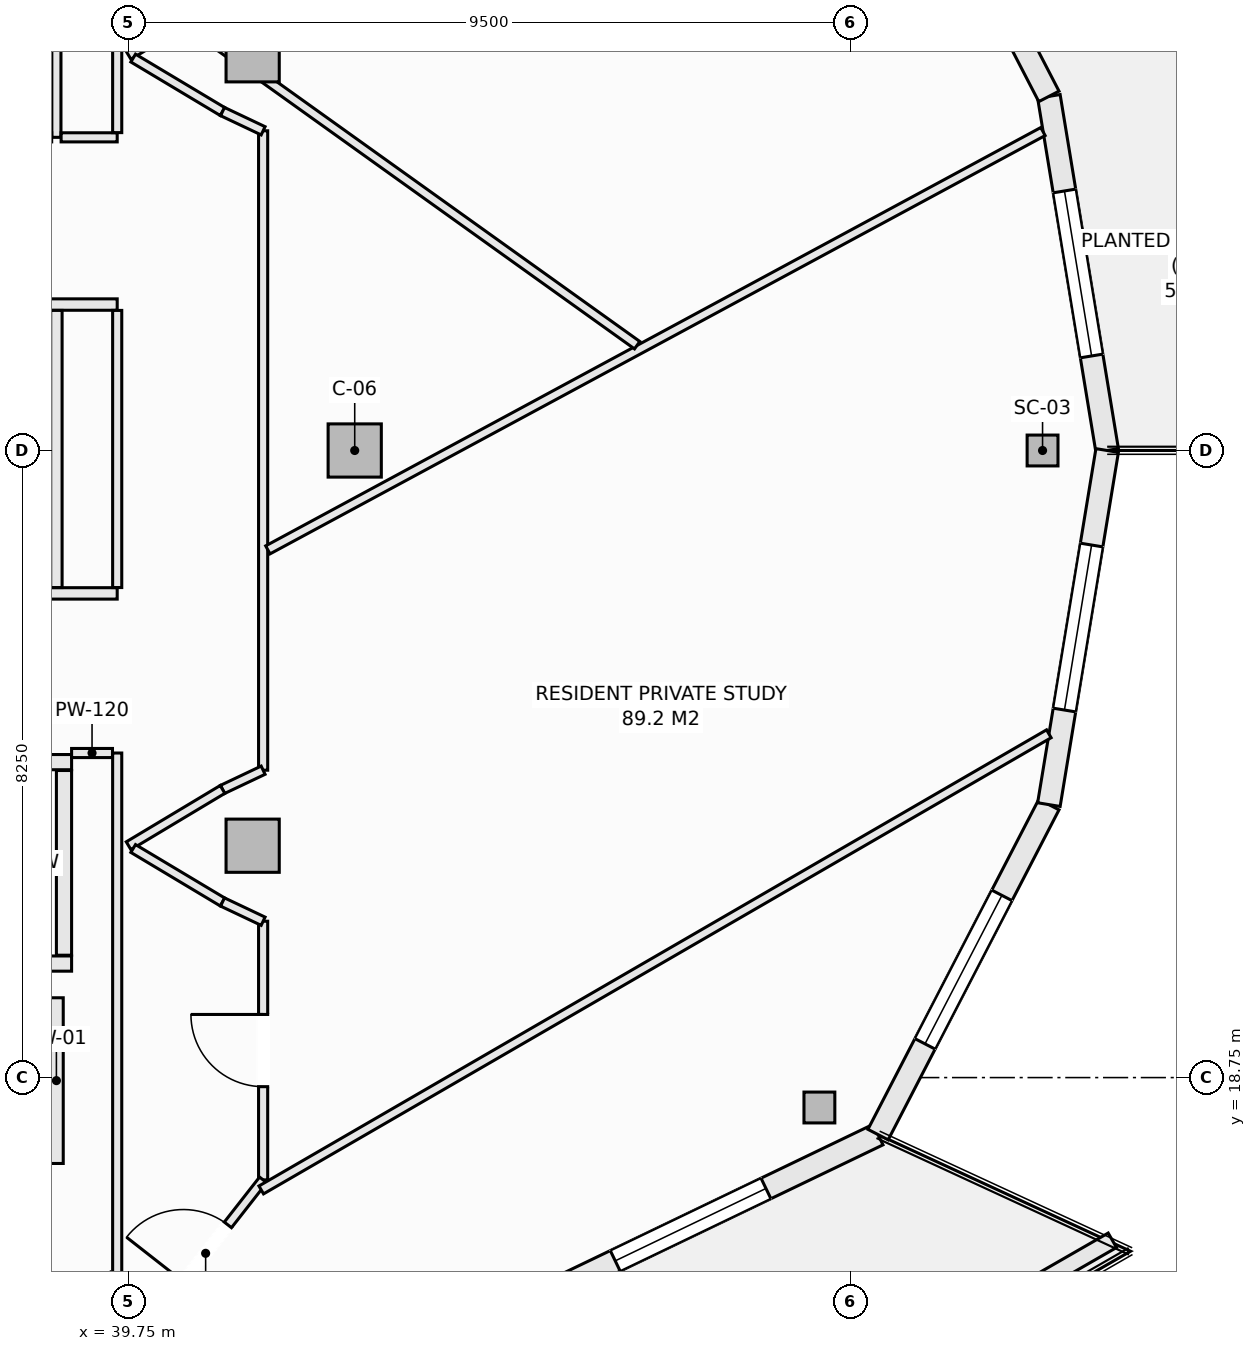
"""IFC4 building model, lengths in metres.
Left out: names, types, materials, properties, quantities, classifications, styles, units other than length and angle.
Written with IfcOpenShell. Run it as: python <this file> out.ifc"""

import sys

from ifc_helpers import new_model, si_unit, direction, frame, frame_2d, origin, origin_2d, place, context, subcontext, project, spatial, rectangle, hollow_rectangle, extrude, element, fill, save


model = new_model("IFC4")
c1 = context("Model", 3, precision=1e-05, world=origin(), true_north=direction((0.0, 1.0)))
c2 = subcontext(c1, "Body", "Model", "MODEL_VIEW")
j1 = project(units=[si_unit("LENGTHUNIT", "METRE"), si_unit("PLANEANGLEUNIT", "RADIAN")], contexts=[c1])
p1 = place(None, origin())
s1 = spatial("IfcSite", under=j1, at=p1, CompositionType="ELEMENT")
p2 = place(p1, origin())
s2 = spatial("IfcBuilding", under=s1, at=p2, CompositionType="ELEMENT")
p3 = place(p2, frame((0.0, 0.0, 249.2)))
s3 = spatial("IfcBuildingStorey", under=s2, at=p3, CompositionType="ELEMENT", Elevation=249.2)
for number, where, z_axis, x_axis in (
    (1, (51.775, 27.0, -0.27), (0.0, 0.0, 1.0), (1.0, 0.0, 0.0)),
    (2, (48.839, 18.356, -0.27), (0.0, 0.0, 1.0), (1.0, 0.0, 0.0)),
):
    element("IfcColumn", number, at=place(p3, frame(where, z_axis=z_axis, x_axis=x_axis)), inside=s3, PredefinedType="COLUMN", context=c2, shape_type="SweptSolid", body=[
        extrude(hollow_rectangle(XDim=0.406, YDim=0.406, WallThickness=0.016, at=origin_2d()), origin(), (0.0, 0.0, 1.0), 3.3),
    ])
for number, where, z_axis, x_axis in (
    (3, (42.725, 27.0, -0.27), (0.0, 0.0, 1.0), (1.0, 0.0, 0.0)),
    (4, (41.382, 32.199, -0.27), (0.0, 0.0, 1.0), (1.0, 0.0, 0.0)),
    (5, (41.382, 21.801, -0.27), (0.0, 0.0, 1.0), (1.0, 0.0, 0.0)),
):
    element("IfcColumn", number, at=place(p3, frame(where, z_axis=z_axis, x_axis=x_axis)), inside=s3, PredefinedType="COLUMN", context=c2, shape_type="SweptSolid", body=[
        extrude(rectangle(XDim=0.7, YDim=0.7, at=origin_2d()), origin(), (0.0, 0.0, 1.0), 3.3),
    ])
p4 = place(p3, frame((51.858, 31.659, 0.0), z_axis=(0.0, 0.0, 1.0), x_axis=(0.162369371657, -0.986730047758, 0.0)))
e6 = element("IfcWall", 6, at=p4, inside=s3, PredefinedType="SOLIDWALL", context=c2, shape_type="SweptSolid", body=[
    extrude(rectangle(XDim=4.721, YDim=0.3, at=frame_2d((2.361, 0.0))), origin(), (0.0, 0.0, 1.0), 2.605),
])
p5 = place(p4, frame((1.261, 0.0, 0.72)))
e7 = element("IfcOpeningElement", 7, at=p5, cuts=e6, PredefinedType="OPENING", context=c2, shape_type="SweptSolid", body=[
    extrude(rectangle(XDim=2.2, YDim=1.65, at=frame_2d((1.1, 0.825))), frame((0.0, 0.16, 0.0), z_axis=(0.0, -1.0, 0.0), x_axis=(1.0, 0.0, 0.0)), (0.0, 0.0, 1.0), 0.32),
])
p6 = place(p3, frame((49.611, 36.0, 0.0), z_axis=(0.0, 0.0, 1.0), x_axis=(0.459793771602, -0.888025724625, 0.0)))
e8 = element("IfcWall", 8, at=p6, inside=s3, PredefinedType="SOLIDWALL", context=c2, shape_type="SweptSolid", body=[
    extrude(rectangle(XDim=4.889, YDim=0.3, at=frame_2d((2.444, 0.0))), origin(), (0.0, 0.0, 1.0), 2.605),
])
p7 = place(p6, frame((1.544, 0.0, 0.0)))
e9 = element("IfcOpeningElement", 9, at=p7, cuts=e8, PredefinedType="OPENING", context=c2, shape_type="SweptSolid", body=[
    extrude(rectangle(XDim=1.8, YDim=2.25, at=frame_2d((0.9, 1.125))), frame((0.0, 0.16, 0.0), z_axis=(0.0, -1.0, 0.0), x_axis=(1.0, 0.0, 0.0)), (0.0, 0.0, 1.0), 0.32),
])
p8 = place(p3, frame((44.677, 15.63, 0.0), z_axis=(0.0, 0.0, 1.0), x_axis=(0.901355238351, 0.433080517106, 0.0)))
e10 = element("IfcWall", 10, at=p8, inside=s3, PredefinedType="SOLIDWALL", context=c2, shape_type="SweptSolid", body=[
    extrude(rectangle(XDim=5.473, YDim=0.3, at=frame_2d((2.737, 0.0))), origin(), (0.0, 0.0, 1.0), 2.605),
])
p9 = place(p8, frame((1.637, 0.0, 0.72)))
e11 = element("IfcOpeningElement", 11, at=p9, cuts=e10, PredefinedType="OPENING", context=c2, shape_type="SweptSolid", body=[
    extrude(rectangle(XDim=2.2, YDim=1.65, at=frame_2d((1.1, 0.825))), frame((0.0, 0.16, 0.0), z_axis=(0.0, -1.0, 0.0), x_axis=(1.0, 0.0, 0.0)), (0.0, 0.0, 1.0), 0.32),
])
p10 = place(p3, frame((49.611, 18.0, 0.0), z_axis=(0.0, 0.0, 1.0), x_axis=(0.459793771602, 0.888025724625, 0.0)))
e12 = element("IfcWall", 12, at=p10, inside=s3, PredefinedType="SOLIDWALL", context=c2, shape_type="SweptSolid", body=[
    extrude(rectangle(XDim=4.889, YDim=0.3, at=frame_2d((2.444, 0.0))), origin(), (0.0, 0.0, 1.0), 2.605),
])
p11 = place(p10, frame((1.344, 0.0, 0.72)))
e13 = element("IfcOpeningElement", 13, at=p11, cuts=e12, PredefinedType="OPENING", context=c2, shape_type="SweptSolid", body=[
    extrude(rectangle(XDim=2.2, YDim=1.65, at=frame_2d((1.1, 0.825))), frame((0.0, 0.16, 0.0), z_axis=(0.0, -1.0, 0.0), x_axis=(1.0, 0.0, 0.0)), (0.0, 0.0, 1.0), 0.32),
])
p12 = place(p3, frame((51.858, 22.341, 0.0), z_axis=(0.0, 0.0, 1.0), x_axis=(0.162369371657, 0.986730047758, 0.0)))
e14 = element("IfcWall", 14, at=p12, inside=s3, PredefinedType="SOLIDWALL", context=c2, shape_type="SweptSolid", body=[
    extrude(rectangle(XDim=4.721, YDim=0.3, at=frame_2d((2.361, 0.0))), origin(), (0.0, 0.0, 1.0), 2.605),
])
p13 = place(p12, frame((1.261, 0.0, 0.72)))
e15 = element("IfcOpeningElement", 15, at=p13, cuts=e14, PredefinedType="OPENING", context=c2, shape_type="SweptSolid", body=[
    extrude(rectangle(XDim=2.2, YDim=1.65, at=frame_2d((1.1, 0.825))), frame((0.0, 0.16, 0.0), z_axis=(0.0, -1.0, 0.0), x_axis=(1.0, 0.0, 0.0)), (0.0, 0.0, 1.0), 0.32),
])
p14 = place(p3, frame((47.321, 13.521, 0.0), z_axis=(0.0, 0.0, 1.0), x_axis=(0.866901621005, 0.49847926687, 0.0)))
e16 = element("IfcWall", 16, at=p14, inside=s3, PredefinedType="PARAPET", context=c2, shape_type="SweptSolid", body=[
    extrude(rectangle(XDim=6.197, YDim=0.22, at=frame_2d((3.098, 0.0))), origin(), (0.0, 0.0, 1.0), 0.52),
])
p15 = place(p3, frame((36.75, 22.9, 0.0), z_axis=(0.0, 0.0, 1.0), x_axis=(1.0, 0.0, 0.0)))
e17 = element("IfcWall", 17, at=p15, inside=s3, PredefinedType="SOLIDWALL", context=c2, shape_type="SweptSolid", body=[
    extrude(rectangle(XDim=2.25, YDim=0.2, at=frame_2d((1.125, 0.0))), origin(), (0.0, 0.0, 1.0), 3.03),
])
p16 = place(p15, frame((0.575, 0.0, 0.0)))
e18 = element("IfcOpeningElement", 18, at=p16, cuts=e17, PredefinedType="OPENING", context=c2, shape_type="SweptSolid", body=[
    extrude(rectangle(XDim=1.1, YDim=2.2, at=frame_2d((0.55, 1.1))), frame((0.0, 0.11, 0.0), z_axis=(0.0, -1.0, 0.0), x_axis=(1.0, 0.0, 0.0)), (0.0, 0.0, 1.0), 0.22),
])
p17 = place(p3, frame((36.75, 20.25, 0.0), z_axis=(0.0, 0.0, 1.0), x_axis=(1.0, 0.0, 0.0)))
e19 = element("IfcWall", 19, at=p17, inside=s3, PredefinedType="SOLIDWALL", context=c2, shape_type="SweptSolid", body=[
    extrude(rectangle(XDim=2.25, YDim=0.2, at=frame_2d((1.125, 0.0))), origin(), (0.0, 0.0, 1.0), 3.03),
])
p18 = place(p3, frame((38.9, 20.36, 0.0), z_axis=(0.0, 0.0, 1.0), x_axis=(0.0, 1.0, 0.0)))
e20 = element("IfcWall", 20, at=p18, inside=s3, PredefinedType="SOLIDWALL", context=c2, shape_type="SweptSolid", body=[
    extrude(rectangle(XDim=2.43, YDim=0.2, at=frame_2d((1.215, 0.0))), origin(), (0.0, 0.0, 1.0), 3.03),
])
p19 = place(p3, frame((29.96, 25.12, 0.0), z_axis=(0.0, 0.0, 1.0), x_axis=(1.0, 0.0, 0.0)))
e21 = element("IfcWall", 21, at=p19, inside=s3, PredefinedType="PARTITIONING", context=c2, shape_type="SweptSolid", body=[
    extrude(rectangle(XDim=9.64, YDim=0.15, at=frame_2d((4.82, 0.0))), origin(), (0.0, 0.0, 1.0), 3.03),
])
p20 = place(p19, frame((3.05, 0.0, 0.0)))
e22 = element("IfcOpeningElement", 22, at=p20, cuts=e21, PredefinedType="OPENING", context=c2, shape_type="SweptSolid", body=[
    extrude(rectangle(XDim=0.95, YDim=2.1, at=frame_2d((0.475, 1.05))), frame((0.0, 0.085, 0.0), z_axis=(0.0, -1.0, 0.0), x_axis=(1.0, 0.0, 0.0)), (0.0, 0.0, 1.0), 0.17),
])
p21 = place(p19, frame((7.265, 0.0, 0.0)))
e23 = element("IfcOpeningElement", 23, at=p21, cuts=e21, PredefinedType="OPENING", context=c2, shape_type="SweptSolid", body=[
    extrude(rectangle(XDim=0.95, YDim=2.1, at=frame_2d((0.475, 1.05))), frame((0.0, 0.085, 0.0), z_axis=(0.0, -1.0, 0.0), x_axis=(1.0, 0.0, 0.0)), (0.0, 0.0, 1.0), 0.17),
])
p22 = place(p3, frame((30.077, 28.92, 0.0), z_axis=(0.0, 0.0, 1.0), x_axis=(1.0, 0.0, 0.0)))
e24 = element("IfcWall", 24, at=p22, inside=s3, PredefinedType="PARTITIONING", context=c2, shape_type="SweptSolid", body=[
    extrude(rectangle(XDim=9.523, YDim=0.15, at=frame_2d((4.762, 0.0))), origin(), (0.0, 0.0, 1.0), 3.03),
])
p23 = place(p3, frame((38.8, 17.62, 0.0), z_axis=(0.0, 0.0, 1.0), x_axis=(0.0, 1.0, 0.0)))
e25 = element("IfcWall", 25, at=p23, inside=s3, PredefinedType="SOLIDWALL", context=c2, shape_type="SweptSolid", body=[
    extrude(rectangle(XDim=2.18, YDim=0.18, at=frame_2d((1.09, 0.0))), origin(), (0.0, 0.0, 1.0), 3.03),
])
p24 = place(p3, frame((38.8, 25.197, 0.0), z_axis=(0.0, 0.0, 1.0), x_axis=(0.0, 1.0, 0.0)))
e26 = element("IfcWall", 26, at=p24, inside=s3, PredefinedType="PARTITIONING", context=c2, shape_type="SweptSolid", body=[
    extrude(rectangle(XDim=3.646, YDim=0.15, at=frame_2d((1.823, 0.0))), origin(), (0.0, 0.0, 1.0), 3.03),
])
p25 = place(p3, frame((38.8, 31.12, 0.0), z_axis=(0.0, 0.0, 1.0), x_axis=(0.0, 1.0, 0.0)))
e27 = element("IfcWall", 27, at=p25, inside=s3, PredefinedType="PARTITIONING", context=c2, shape_type="SweptSolid", body=[
    extrude(rectangle(XDim=2.63, YDim=0.12, at=frame_2d((1.315, 0.0))), origin(), (0.0, 0.0, 1.0), 3.03),
])
p26 = place(p3, frame((38.862, 31.12, 0.0), z_axis=(0.0, 0.0, 1.0), x_axis=(1.0, 0.0, 0.0)))
e28 = element("IfcWall", 28, at=p26, inside=s3, PredefinedType="PARTITIONING", context=c2, shape_type="SweptSolid", body=[
    extrude(rectangle(XDim=0.738, YDim=0.12, at=frame_2d((0.369, 0.0))), origin(), (0.0, 0.0, 1.0), 3.03),
])
p27 = place(p3, frame((39.6, 14.952, 0.0), z_axis=(0.0, 0.0, 1.0), x_axis=(0.0, 1.0, 0.0)))
e29 = element("IfcWall", 29, at=p27, inside=s3, PredefinedType="PARTITIONING", context=c2, shape_type="SweptSolid", body=[
    extrude(rectangle(XDim=8.068, YDim=0.12, at=frame_2d((4.034, 0.0))), origin(), (0.0, 0.0, 1.0), 2.478),
])
p28 = place(p3, frame((39.6, 25.197, 0.0), z_axis=(0.0, 0.0, 1.0), x_axis=(0.0, 1.0, 0.0)))
e30 = element("IfcWall", 30, at=p28, inside=s3, PredefinedType="PARTITIONING", context=c2, shape_type="SweptSolid", body=[
    extrude(rectangle(XDim=3.646, YDim=0.12, at=frame_2d((1.823, 0.0))), origin(), (0.0, 0.0, 1.0), 3.03),
])
p29 = place(p3, frame((39.6, 31.182, 0.0), z_axis=(0.0, 0.0, 1.0), x_axis=(0.0, 1.0, 0.0)))
e31 = element("IfcWall", 31, at=p29, inside=s3, PredefinedType="PARTITIONING", context=c2, shape_type="SweptSolid", body=[
    extrude(rectangle(XDim=7.866, YDim=0.12, at=frame_2d((3.933, 0.0))), origin(), (0.0, 0.0, 1.0), 3.03),
])
p30 = place(p3, frame((41.52, 17.404, 0.0), z_axis=(0.0, 0.0, 1.0), x_axis=(0.0, 1.0, 0.0)))
e32 = element("IfcWall", 32, at=p30, inside=s3, PredefinedType="PARTITIONING", context=c2, shape_type="SweptSolid", body=[
    extrude(rectangle(XDim=3.403, YDim=0.12, at=frame_2d((1.701, 0.0))), origin(), (0.0, 0.0, 1.0), 3.03),
])
p31 = place(p30, frame((1.227, 0.0, 0.0)))
e33 = element("IfcOpeningElement", 33, at=p31, cuts=e32, PredefinedType="OPENING", context=c2, shape_type="SweptSolid", body=[
    extrude(rectangle(XDim=0.95, YDim=2.1, at=frame_2d((0.475, 1.05))), frame((0.0, 0.07, 0.0), z_axis=(0.0, -1.0, 0.0), x_axis=(1.0, 0.0, 0.0)), (0.0, 0.0, 1.0), 0.14),
])
p32 = place(p3, frame((41.52, 22.794, 0.0), z_axis=(0.0, 0.0, 1.0), x_axis=(0.0, 1.0, 0.0)))
e34 = element("IfcWall", 34, at=p32, inside=s3, PredefinedType="PARTITIONING", context=c2, shape_type="SweptSolid", body=[
    extrude(rectangle(XDim=8.412, YDim=0.12, at=frame_2d((4.206, 0.0))), origin(), (0.0, 0.0, 1.0), 2.478),
])
p33 = place(p3, frame((39.75, 32.199, 0.0), z_axis=(0.0, 0.0, 1.0), x_axis=(0.857702120906, 0.514146935996, 0.0)))
e35 = element("IfcWall", 35, at=p33, inside=s3, PredefinedType="PARTITIONING", context=c2, shape_type="SweptSolid", body=[
    extrude(rectangle(XDim=1.441, YDim=0.12, at=frame_2d((0.721, 0.0))), origin(), (0.0, 0.0, 1.0), 3.03),
])
p34 = place(p3, frame((39.81, 32.163, 0.0), z_axis=(0.0, 0.0, 1.0), x_axis=(0.858011245414, -0.513630901273, 0.0)))
e36 = element("IfcWall", 36, at=p34, inside=s3, PredefinedType="PARTITIONING", context=c2, shape_type="SweptSolid", body=[
    extrude(rectangle(XDim=1.37, YDim=0.12, at=frame_2d((0.685, 0.0))), origin(), (0.0, 0.0, 1.0), 3.03),
])
for number, where, z_axis, x_axis in (
    (37, (40.986, 31.459, 0.0), (0.0, 0.0, 1.0), (0.904, -0.428, 0.0)),
    (38, (40.986, 22.541, 0.0), (0.0, 0.0, 1.0), (0.904, 0.428, 0.0)),
):
    element("IfcWall", number, at=place(p3, frame(where, z_axis=z_axis, x_axis=x_axis)), inside=s3, PredefinedType="PARTITIONING", context=c2, shape_type="SweptSolid", body=[
        extrude(rectangle(XDim=0.591, YDim=0.12, at=frame_2d((0.295, 0.0))), origin(), (0.0, 0.0, 1.0), 3.03),
    ])
p35 = place(p3, frame((39.75, 21.8, 0.0), z_axis=(0.0, 0.0, 1.0), x_axis=(0.857702120906, 0.514146935996, 0.0)))
e39 = element("IfcWall", 39, at=p35, inside=s3, PredefinedType="PARTITIONING", context=c2, shape_type="SweptSolid", body=[
    extrude(rectangle(XDim=1.441, YDim=0.12, at=frame_2d((0.721, 0.0))), origin(), (0.0, 0.0, 1.0), 3.03),
])
p36 = place(p3, frame((39.81, 21.764, 0.0), z_axis=(0.0, 0.0, 1.0), x_axis=(0.858011245414, -0.513630901273, 0.0)))
e40 = element("IfcWall", 40, at=p36, inside=s3, PredefinedType="PARTITIONING", context=c2, shape_type="SweptSolid", body=[
    extrude(rectangle(XDim=1.37, YDim=0.12, at=frame_2d((0.685, 0.0))), origin(), (0.0, 0.0, 1.0), 3.03),
])
p37 = place(p3, frame((40.986, 21.06, 0.0), z_axis=(0.0, 0.0, 1.0), x_axis=(0.90356951601, -0.428441512621, 0.0)))
e41 = element("IfcWall", 41, at=p37, inside=s3, PredefinedType="PARTITIONING", context=c2, shape_type="SweptSolid", body=[
    extrude(rectangle(XDim=0.591, YDim=0.12, at=frame_2d((0.295, 0.0))), origin(), (0.0, 0.0, 1.0), 3.03),
])
p38 = place(p3, frame((39.662, 15.031, 0.0), z_axis=(0.0, 0.0, 1.0), x_axis=(0.616500468458, 0.787354540465, 0.0)))
e42 = element("IfcWall", 42, at=p38, inside=s3, PredefinedType="PARTITIONING", context=c2, shape_type="SweptSolid", body=[
    extrude(rectangle(XDim=3.014, YDim=0.12, at=frame_2d((1.507, 0.0))), origin(), (0.0, 0.0, 1.0), 3.03),
])
p39 = place(p38, frame((1.312, 0.0, 0.0)))
e43 = element("IfcOpeningElement", 43, at=p39, cuts=e42, PredefinedType="OPENING", context=c2, shape_type="SweptSolid", body=[
    extrude(rectangle(XDim=0.95, YDim=2.1, at=frame_2d((0.475, 1.05))), frame((0.0, 0.07, 0.0), z_axis=(0.0, -1.0, 0.0), x_axis=(1.0, 0.0, 0.0)), (0.0, 0.0, 1.0), 0.14),
])
p40 = place(p3, frame((39.0, 23.02, 0.0), z_axis=(0.0, 0.0, 1.0), x_axis=(1.0, 0.0, 0.0)))
e44 = element("IfcWall", 44, at=p40, inside=s3, PredefinedType="PARTITIONING", context=c2, shape_type="SweptSolid", body=[
    extrude(rectangle(XDim=0.538, YDim=0.12, at=frame_2d((0.269, 0.0))), origin(), (0.0, 0.0, 1.0), 3.03),
])
p41 = place(p3, frame((41.582, 25.693, 0.0), z_axis=(0.0, 0.0, 1.0), x_axis=(0.880032375067, 0.474913696195, 0.0)))
e45 = element("IfcWall", 45, at=p41, inside=s3, PredefinedType="PARTITIONING", context=c2, shape_type="SweptSolid", body=[
    extrude(rectangle(XDim=11.589, YDim=0.12, at=frame_2d((5.794, 0.0))), origin(), (0.0, 0.0, 1.0), 2.478),
])
p42 = place(p3, frame((41.495, 17.272, 0.0), z_axis=(0.0, 0.0, 1.0), x_axis=(0.865359277242, 0.501151994201, 0.0)))
e46 = element("IfcWall", 46, at=p42, inside=s3, PredefinedType="PARTITIONING", context=c2, shape_type="SweptSolid", body=[
    extrude(rectangle(XDim=11.975, YDim=0.12, at=frame_2d((5.987, 0.0))), origin(), (0.0, 0.0, 1.0), 3.03),
])
p43 = place(p3, frame((40.546, 32.604, 0.0), z_axis=(0.0, 0.0, 1.0), x_axis=(0.813264440548, -0.581894277116, 0.0)))
e47 = element("IfcWall", 47, at=p43, inside=s3, PredefinedType="PARTITIONING", context=c2, shape_type="SweptSolid", body=[
    extrude(rectangle(XDim=7.249, YDim=0.12, at=frame_2d((3.625, 0.0))), origin(), (0.0, 0.0, 1.0), 3.03),
])
p44 = place(p5, origin())
e48 = element("IfcWindow", 48, at=p44, inside=s3, PartitioningType="SINGLE_PANEL", PredefinedType="WINDOW", context=c2, shape_type="SweptSolid", body=[
    extrude(rectangle(XDim=2.2, YDim=1.65, at=frame_2d((1.1, 0.825))), frame((0.0, 0.03, 0.0), z_axis=(0.0, -1.0, 0.0), x_axis=(1.0, 0.0, 0.0)), (0.0, 0.0, 1.0), 0.06),
])
fill(e7, e48)
p45 = place(p9, origin())
e49 = element("IfcWindow", 49, at=p45, inside=s3, PartitioningType="SINGLE_PANEL", PredefinedType="WINDOW", context=c2, shape_type="SweptSolid", body=[
    extrude(rectangle(XDim=2.2, YDim=1.65, at=frame_2d((1.1, 0.825))), frame((0.0, 0.03, 0.0), z_axis=(0.0, -1.0, 0.0), x_axis=(1.0, 0.0, 0.0)), (0.0, 0.0, 1.0), 0.06),
])
fill(e11, e49)
p46 = place(p11, origin())
e50 = element("IfcWindow", 50, at=p46, inside=s3, PartitioningType="SINGLE_PANEL", PredefinedType="WINDOW", context=c2, shape_type="SweptSolid", body=[
    extrude(rectangle(XDim=2.2, YDim=1.65, at=frame_2d((1.1, 0.825))), frame((0.0, 0.03, 0.0), z_axis=(0.0, -1.0, 0.0), x_axis=(1.0, 0.0, 0.0)), (0.0, 0.0, 1.0), 0.06),
])
fill(e13, e50)
p47 = place(p13, origin())
e51 = element("IfcWindow", 51, at=p47, inside=s3, PartitioningType="SINGLE_PANEL", PredefinedType="WINDOW", context=c2, shape_type="SweptSolid", body=[
    extrude(rectangle(XDim=2.2, YDim=1.65, at=frame_2d((1.1, 0.825))), frame((0.0, 0.03, 0.0), z_axis=(0.0, -1.0, 0.0), x_axis=(1.0, 0.0, 0.0)), (0.0, 0.0, 1.0), 0.06),
])
fill(e15, e51)
p48 = place(p39, origin())
e52 = element("IfcDoor", 52, at=p48, inside=s3, OperationType="SINGLE_SWING_LEFT", PredefinedType="DOOR", context=c2, shape_type="SweptSolid", body=[
    extrude(rectangle(XDim=0.95, YDim=2.1, at=frame_2d((0.475, 1.05))), frame((0.0, 0.025, 0.0), z_axis=(0.0, -1.0, 0.0), x_axis=(1.0, 0.0, 0.0)), (0.0, 0.0, 1.0), 0.05),
])
fill(e43, e52)
p49 = place(p31, origin())
e53 = element("IfcDoor", 53, at=p49, inside=s3, OperationType="SINGLE_SWING_RIGHT", PredefinedType="DOOR", context=c2, shape_type="SweptSolid", body=[
    extrude(rectangle(XDim=0.95, YDim=2.1, at=frame_2d((0.475, 1.05))), frame((0.0, 0.025, 0.0), z_axis=(0.0, -1.0, 0.0), x_axis=(1.0, 0.0, 0.0)), (0.0, 0.0, 1.0), 0.05),
])
fill(e33, e53)
save(model, sys.argv[1])
